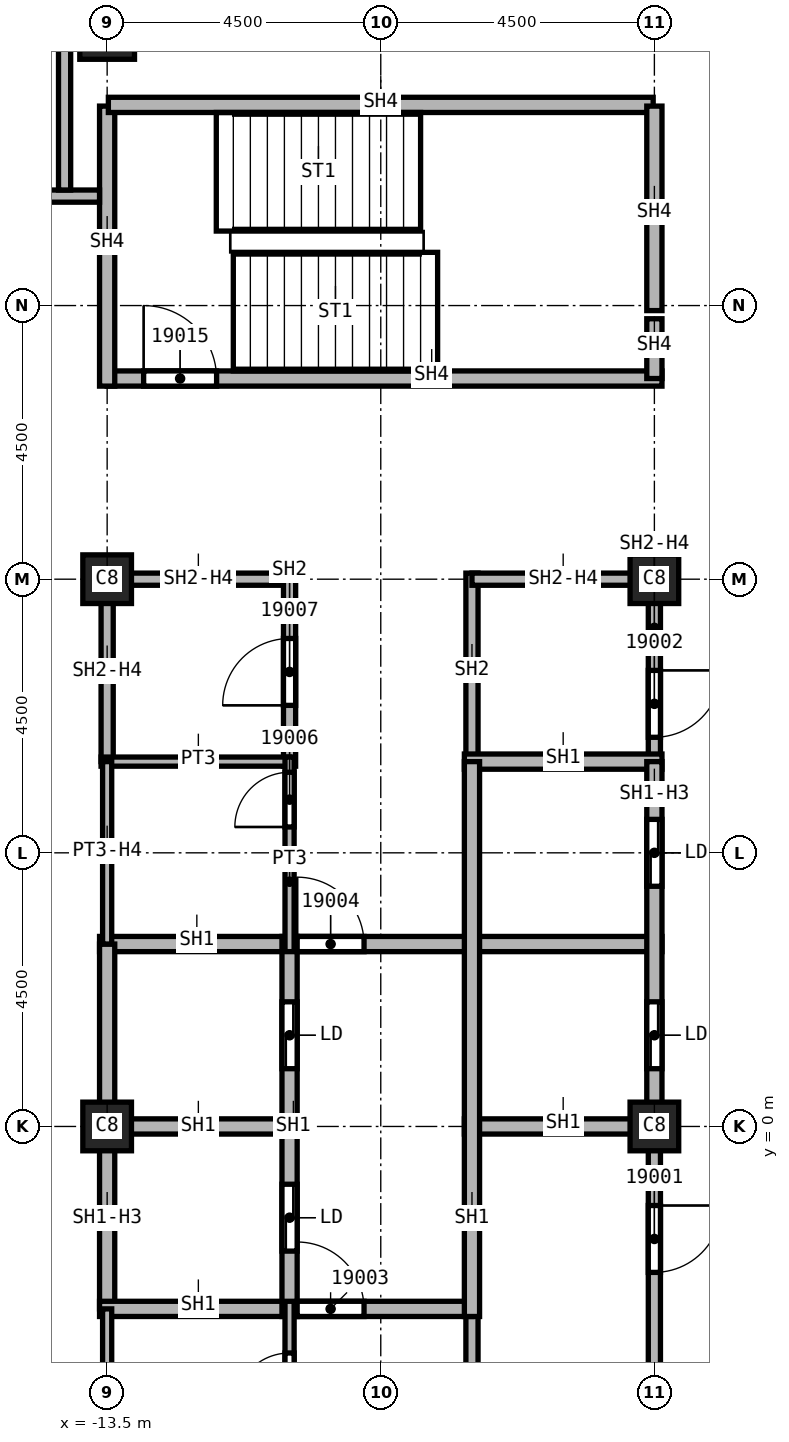
"""IFC4 building model, lengths in metres.
Left out: names, types, materials, properties, quantities, classifications, styles, units other than length and angle.
Written with IfcOpenShell. Run it as: python <this file> out.ifc"""

import sys

from ifc_helpers import new_model, si_unit, direction, frame, frame_2d, origin, origin_2d, place, context, subcontext, project, spatial, rectangle, extrude, element, fill, save


model = new_model("IFC4")
c1 = context("Model", 3, precision=1e-05, world=origin(), true_north=direction((0.0, 1.0)))
c2 = subcontext(c1, "Body", "Model", "MODEL_VIEW")
j1 = project(units=[si_unit("LENGTHUNIT", "METRE"), si_unit("PLANEANGLEUNIT", "RADIAN")], contexts=[c1])
p1 = place(None, origin())
s1 = spatial("IfcSite", under=j1, at=p1, CompositionType="ELEMENT")
p2 = place(p1, origin())
s2 = spatial("IfcBuilding", under=s1, at=p2, CompositionType="ELEMENT")
p3 = place(p2, frame((0.0, 0.0, 278.0)))
s3 = spatial("IfcBuildingStorey", under=s2, at=p3, CompositionType="ELEMENT", Elevation=278.0)
p4 = place(p3, frame((-13.5, 18.0, 0.0), z_axis=(0.0, 0.0, 1.0), x_axis=(1.0, 0.0, 0.0)))
e1 = element("IfcColumn", 1, at=p4, inside=s3, PredefinedType="COLUMN", context=c2, shape_type="SweptSolid", body=[
    extrude(rectangle(XDim=0.9, YDim=0.9, at=origin_2d()), origin(), (0.0, 0.0, 1.0), 3.72),
])
for number, where, z_axis, x_axis in (
    (2, (-4.5, 0.0, 0.0), (0.0, 0.0, 1.0), (1.0, 0.0, 0.0)),
    (3, (-4.5, 9.0, 0.0), (0.0, 0.0, 1.0), (1.0, 0.0, 0.0)),
    (4, (-13.5, 0.0, 0.0), (0.0, 0.0, 1.0), (1.0, 0.0, 0.0)),
    (5, (-13.5, 9.0, 0.0), (0.0, 0.0, 1.0), (1.0, 0.0, 0.0)),
):
    element("IfcColumn", number, at=place(p3, frame(where, z_axis=z_axis, x_axis=x_axis)), inside=s3, PredefinedType="COLUMN", context=c2, shape_type="SweptSolid", body=[
        extrude(rectangle(XDim=0.8, YDim=0.8, at=origin_2d()), origin(), (0.0, 0.0, 1.0), 3.72),
    ])
p5 = place(p3, frame((-13.5, 6.0, 0.0), z_axis=(0.0, 0.0, 1.0), x_axis=(0.0, 1.0, 0.0)))
e6 = element("IfcWall", 6, at=p5, inside=s3, PredefinedType="SOLIDWALL", context=c2, shape_type="SweptSolid", body=[
    extrude(rectangle(XDim=3.1, YDim=0.2, at=frame_2d((1.55, 0.0))), origin(), (0.0, 0.0, 1.0), 3.042),
])
p6 = place(p3, frame((-13.5, 9.0, 0.0), z_axis=(0.0, 0.0, 1.0), x_axis=(1.0, 0.0, 0.0)))
e7 = element("IfcWall", 7, at=p6, inside=s3, PredefinedType="SOLIDWALL", context=c2, shape_type="SweptSolid", body=[
    extrude(rectangle(XDim=3.0, YDim=0.2, at=frame_2d((1.5, 0.0))), origin(), (0.0, 0.0, 1.0), 3.042),
])
p7 = place(p3, frame((-10.5, 5.925, 0.0), z_axis=(0.0, 0.0, 1.0), x_axis=(0.0, 1.0, 0.0)))
e8 = element("IfcWall", 8, at=p7, inside=s3, PredefinedType="SOLIDWALL", context=c2, shape_type="SweptSolid", body=[
    extrude(rectangle(XDim=3.175, YDim=0.2, at=frame_2d((1.587, 0.0))), origin(), (0.0, 0.0, 1.0), 3.72),
])
p8 = place(p7, frame((1.0, 0.0, 0.0)))
e9 = element("IfcOpeningElement", 9, at=p8, cuts=e8, PredefinedType="OPENING", context=c2, shape_type="SweptSolid", body=[
    extrude(rectangle(XDim=1.1, YDim=2.1, at=frame_2d((0.55, 1.05))), frame((0.0, 0.1, 0.0), z_axis=(0.0, -1.0, 0.0), x_axis=(1.0, 0.0, 0.0)), (0.0, 0.0, 1.0), 0.2),
])
p9 = place(p3, frame((-7.5, -9.1, 0.0), z_axis=(0.0, 0.0, 1.0), x_axis=(0.0, 1.0, 0.0)))
e10 = element("IfcWall", 10, at=p9, inside=s3, PredefinedType="SOLIDWALL", context=c2, shape_type="SweptSolid", body=[
    extrude(rectangle(XDim=6.225, YDim=0.2, at=frame_2d((3.113, 0.0))), origin(), (0.0, 0.0, 1.0), 3.72),
])
p10 = place(p3, frame((-7.5, 6.0, 0.0), z_axis=(0.0, 0.0, 1.0), x_axis=(0.0, 1.0, 0.0)))
e11 = element("IfcWall", 11, at=p10, inside=s3, PredefinedType="SOLIDWALL", context=c2, shape_type="SweptSolid", body=[
    extrude(rectangle(XDim=3.1, YDim=0.2, at=frame_2d((1.55, 0.0))), origin(), (0.0, 0.0, 1.0), 3.72),
])
p11 = place(p3, frame((-7.5, 9.0, 0.0), z_axis=(0.0, 0.0, 1.0), x_axis=(1.0, 0.0, 0.0)))
e12 = element("IfcWall", 12, at=p11, inside=s3, PredefinedType="SOLIDWALL", context=c2, shape_type="SweptSolid", body=[
    extrude(rectangle(XDim=3.0, YDim=0.2, at=frame_2d((1.5, 0.0))), origin(), (0.0, 0.0, 1.0), 3.042),
])
p12 = place(p3, frame((-4.5, 0.0, 0.0), z_axis=(0.0, 0.0, 1.0), x_axis=(0.0, -1.0, 0.0)))
e13 = element("IfcWall", 13, at=p12, inside=s3, PredefinedType="SOLIDWALL", context=c2, shape_type="SweptSolid", body=[
    extrude(rectangle(XDim=9.1, YDim=0.2, at=frame_2d((4.55, 0.0))), origin(), (0.0, 0.0, 1.0), 3.042),
])
p13 = place(p12, frame((1.3, 0.0, 0.0)))
e14 = element("IfcOpeningElement", 14, at=p13, cuts=e13, PredefinedType="OPENING", context=c2, shape_type="SweptSolid", body=[
    extrude(rectangle(XDim=1.1, YDim=2.1, at=frame_2d((0.55, 1.05))), frame((0.0, 0.1, 0.0), z_axis=(0.0, -1.0, 0.0), x_axis=(1.0, 0.0, 0.0)), (0.0, 0.0, 1.0), 0.2),
])
p14 = place(p3, frame((-4.5, 9.1, 0.0), z_axis=(0.0, 0.0, 1.0), x_axis=(0.0, -1.0, 0.0)))
e15 = element("IfcWall", 15, at=p14, inside=s3, PredefinedType="SOLIDWALL", context=c2, shape_type="SweptSolid", body=[
    extrude(rectangle(XDim=3.1, YDim=0.2, at=frame_2d((1.55, 0.0))), origin(), (0.0, 0.0, 1.0), 3.042),
])
p15 = place(p14, frame((1.6, 0.0, 0.0)))
e16 = element("IfcOpeningElement", 16, at=p15, cuts=e15, PredefinedType="OPENING", context=c2, shape_type="SweptSolid", body=[
    extrude(rectangle(XDim=1.1, YDim=2.1, at=frame_2d((0.55, 1.05))), frame((0.0, 0.1, 0.0), z_axis=(0.0, -1.0, 0.0), x_axis=(1.0, 0.0, 0.0)), (0.0, 0.0, 1.0), 0.2),
])
p16 = place(p3, frame((-13.625, 0.0, 0.0), z_axis=(0.0, 0.0, 1.0), x_axis=(1.0, 0.0, 0.0)))
e17 = element("IfcWall", 17, at=p16, inside=s3, PredefinedType="SOLIDWALL", context=c2, shape_type="SweptSolid", body=[
    extrude(rectangle(XDim=3.125, YDim=0.25, at=frame_2d((1.562, 0.0))), origin(), (0.0, 0.0, 1.0), 3.72),
])
p17 = place(p3, frame((-13.625, 3.0, 0.0), z_axis=(0.0, 0.0, 1.0), x_axis=(1.0, 0.0, 0.0)))
e18 = element("IfcWall", 18, at=p17, inside=s3, PredefinedType="SOLIDWALL", context=c2, shape_type="SweptSolid", body=[
    extrude(rectangle(XDim=9.25, YDim=0.25, at=frame_2d((4.625, 0.0))), origin(), (0.0, 0.0, 1.0), 3.72),
])
p18 = place(p17, frame((3.25, 0.0, 0.0)))
e19 = element("IfcOpeningElement", 19, at=p18, cuts=e18, PredefinedType="OPENING", context=c2, shape_type="SweptSolid", body=[
    extrude(rectangle(XDim=1.1, YDim=2.1, at=frame_2d((0.55, 1.05))), frame((0.0, 0.125, 0.0), z_axis=(0.0, -1.0, 0.0), x_axis=(1.0, 0.0, 0.0)), (0.0, 0.0, 1.0), 0.25),
])
p19 = place(p3, frame((-13.5, -3.0, 0.0), z_axis=(0.0, 0.0, 1.0), x_axis=(0.0, 1.0, 0.0)))
e20 = element("IfcWall", 20, at=p19, inside=s3, PredefinedType="SOLIDWALL", context=c2, shape_type="SweptSolid", body=[
    extrude(rectangle(XDim=6.0, YDim=0.25, at=frame_2d((3.0, 0.0))), origin(), (0.0, 0.0, 1.0), 3.042),
])
p20 = place(p3, frame((-13.625, -3.0, 0.0), z_axis=(0.0, 0.0, 1.0), x_axis=(1.0, 0.0, 0.0)))
e21 = element("IfcWall", 21, at=p20, inside=s3, PredefinedType="SOLIDWALL", context=c2, shape_type="SweptSolid", body=[
    extrude(rectangle(XDim=6.125, YDim=0.25, at=frame_2d((3.062, 0.0))), origin(), (0.0, 0.0, 1.0), 3.72),
])
p21 = place(p20, frame((3.25, 0.0, 0.0)))
e22 = element("IfcOpeningElement", 22, at=p21, cuts=e21, PredefinedType="OPENING", context=c2, shape_type="SweptSolid", body=[
    extrude(rectangle(XDim=1.1, YDim=2.1, at=frame_2d((0.55, 1.05))), frame((0.0, 0.125, 0.0), z_axis=(0.0, -1.0, 0.0), x_axis=(1.0, 0.0, 0.0)), (0.0, 0.0, 1.0), 0.25),
])
p22 = place(p3, frame((-10.5, -3.125, 0.0), z_axis=(0.0, 0.0, 1.0), x_axis=(0.0, 1.0, 0.0)))
e23 = element("IfcWall", 23, at=p22, inside=s3, PredefinedType="SOLIDWALL", context=c2, shape_type="SweptSolid", body=[
    extrude(rectangle(XDim=6.25, YDim=0.25, at=frame_2d((3.125, 0.0))), origin(), (0.0, 0.0, 1.0), 3.72),
])
p23 = place(p22, frame((1.075, 0.0, 0.0)))
e24 = element("IfcOpeningElement", 24, at=p23, cuts=e23, PredefinedType="OPENING", context=c2, shape_type="SweptSolid", body=[
    extrude(rectangle(XDim=1.1, YDim=2.1, at=frame_2d((0.55, 1.05))), frame((0.0, 0.125, 0.0), z_axis=(0.0, -1.0, 0.0), x_axis=(1.0, 0.0, 0.0)), (0.0, 0.0, 1.0), 0.25),
])
p24 = place(p22, frame((4.075, 0.0, 0.0)))
e25 = element("IfcOpeningElement", 25, at=p24, cuts=e23, PredefinedType="OPENING", context=c2, shape_type="SweptSolid", body=[
    extrude(rectangle(XDim=1.1, YDim=2.1, at=frame_2d((0.55, 1.05))), frame((0.0, 0.125, 0.0), z_axis=(0.0, -1.0, 0.0), x_axis=(1.0, 0.0, 0.0)), (0.0, 0.0, 1.0), 0.25),
])
for number, where, z_axis, x_axis in (
    (26, (-7.625, 0.0, 0.0), (0.0, 0.0, 1.0), (1.0, 0.0, 0.0)),
    (27, (-7.625, 6.0, 0.0), (0.0, 0.0, 1.0), (1.0, 0.0, 0.0)),
):
    element("IfcWall", number, at=place(p3, frame(where, z_axis=z_axis, x_axis=x_axis)), inside=s3, PredefinedType="SOLIDWALL", context=c2, shape_type="SweptSolid", body=[
        extrude(rectangle(XDim=3.25, YDim=0.25, at=frame_2d((1.625, 0.0))), origin(), (0.0, 0.0, 1.0), 3.72),
    ])
p25 = place(p3, frame((-7.5, -3.125, 0.0), z_axis=(0.0, 0.0, 1.0), x_axis=(0.0, 1.0, 0.0)))
e28 = element("IfcWall", 28, at=p25, inside=s3, PredefinedType="SOLIDWALL", context=c2, shape_type="SweptSolid", body=[
    extrude(rectangle(XDim=9.125, YDim=0.25, at=frame_2d((4.562, 0.0))), origin(), (0.0, 0.0, 1.0), 3.72),
])
p26 = place(p3, frame((-4.5, 6.0, 0.0), z_axis=(0.0, 0.0, 1.0), x_axis=(0.0, -1.0, 0.0)))
e29 = element("IfcWall", 29, at=p26, inside=s3, PredefinedType="SOLIDWALL", context=c2, shape_type="SweptSolid", body=[
    extrude(rectangle(XDim=6.0, YDim=0.25, at=frame_2d((3.0, 0.0))), origin(), (0.0, 0.0, 1.0), 3.042),
])
p27 = place(p26, frame((3.95, 0.0, 0.0)))
e30 = element("IfcOpeningElement", 30, at=p27, cuts=e29, PredefinedType="OPENING", context=c2, shape_type="SweptSolid", body=[
    extrude(rectangle(XDim=1.1, YDim=2.1, at=frame_2d((0.55, 1.05))), frame((0.0, 0.125, 0.0), z_axis=(0.0, -1.0, 0.0), x_axis=(1.0, 0.0, 0.0)), (0.0, 0.0, 1.0), 0.25),
])
p28 = place(p26, frame((0.95, 0.0, 0.0)))
e31 = element("IfcOpeningElement", 31, at=p28, cuts=e29, PredefinedType="OPENING", context=c2, shape_type="SweptSolid", body=[
    extrude(rectangle(XDim=1.1, YDim=2.1, at=frame_2d((0.55, 1.05))), frame((0.0, 0.125, 0.0), z_axis=(0.0, -1.0, 0.0), x_axis=(1.0, 0.0, 0.0)), (0.0, 0.0, 1.0), 0.25),
])
p29 = place(p3, frame((-13.5, 12.3, 0.0), z_axis=(0.0, 0.0, 1.0), x_axis=(1.0, 0.0, 0.0)))
e32 = element("IfcWall", 32, at=p29, inside=s3, PredefinedType="SOLIDWALL", context=c2, shape_type="SweptSolid", body=[
    extrude(rectangle(XDim=9.125, YDim=0.25, at=frame_2d((4.562, 0.0))), origin(), (0.0, 0.0, 1.0), 3.72),
])
p30 = place(p29, frame((0.6, 0.0, 0.0)))
e33 = element("IfcOpeningElement", 33, at=p30, cuts=e32, PredefinedType="OPENING", context=c2, shape_type="SweptSolid", body=[
    extrude(rectangle(XDim=1.2, YDim=2.1, at=frame_2d((0.6, 1.05))), frame((0.0, 0.125, 0.0), z_axis=(0.0, -1.0, 0.0), x_axis=(1.0, 0.0, 0.0)), (0.0, 0.0, 1.0), 0.25),
])
p31 = place(p3, frame((-13.5, 16.78, 0.0), z_axis=(0.0, 0.0, 1.0), x_axis=(0.0, -1.0, 0.0)))
e34 = element("IfcWall", 34, at=p31, inside=s3, PredefinedType="SOLIDWALL", context=c2, shape_type="SweptSolid", body=[
    extrude(rectangle(XDim=4.605, YDim=0.25, at=frame_2d((2.302, 0.0))), origin(), (0.0, 0.0, 1.0), 3.72),
])
p32 = place(p3, frame((-13.48, 16.8, 0.0), z_axis=(0.0, 0.0, 1.0), x_axis=(1.0, 0.0, 0.0)))
e35 = element("IfcWall", 35, at=p32, inside=s3, PredefinedType="SOLIDWALL", context=c2, shape_type="SweptSolid", body=[
    extrude(rectangle(XDim=8.96, YDim=0.25, at=frame_2d((4.48, 0.0))), origin(), (0.0, 0.0, 1.0), 3.72),
])
p33 = place(p3, frame((-4.5, 13.283, 0.0), z_axis=(0.0, 0.0, 1.0), x_axis=(0.0, -1.0, 0.0)))
e36 = element("IfcWall", 36, at=p33, inside=s3, PredefinedType="SOLIDWALL", context=c2, shape_type="SweptSolid", body=[
    extrude(rectangle(XDim=0.983, YDim=0.25, at=frame_2d((0.491, 0.0))), origin(), (0.0, 0.0, 1.0), 3.72),
])
p34 = place(p3, frame((-4.5, 16.78, 0.0), z_axis=(0.0, 0.0, 1.0), x_axis=(0.0, -1.0, 0.0)))
e37 = element("IfcWall", 37, at=p34, inside=s3, PredefinedType="SOLIDWALL", context=c2, shape_type="SweptSolid", body=[
    extrude(rectangle(XDim=3.363, YDim=0.25, at=frame_2d((1.682, 0.0))), origin(), (0.0, 0.0, 1.0), 3.72),
])
p35 = place(p3, frame((-13.6, 6.0, 0.0), z_axis=(0.0, 0.0, 1.0), x_axis=(1.0, 0.0, 0.0)))
e38 = element("IfcWall", 38, at=p35, inside=s3, PredefinedType="PARTITIONING", context=c2, shape_type="SweptSolid", body=[
    extrude(rectangle(XDim=3.1, YDim=0.15, at=frame_2d((1.55, 0.0))), origin(), (0.0, 0.0, 1.0), 3.72),
])
p36 = place(p3, frame((-13.5, -9.075, 0.0), z_axis=(0.0, 0.0, 1.0), x_axis=(0.0, 1.0, 0.0)))
e39 = element("IfcWall", 39, at=p36, inside=s3, PredefinedType="PARTITIONING", context=c2, shape_type="SweptSolid", body=[
    extrude(rectangle(XDim=6.075, YDim=0.15, at=frame_2d((3.038, 0.0))), origin(), (0.0, 0.0, 1.0), 3.042),
])
p37 = place(p3, frame((-13.5, 3.0, 0.0), z_axis=(0.0, 0.0, 1.0), x_axis=(0.0, 1.0, 0.0)))
e40 = element("IfcWall", 40, at=p37, inside=s3, PredefinedType="PARTITIONING", context=c2, shape_type="SweptSolid", body=[
    extrude(rectangle(XDim=3.0, YDim=0.15, at=frame_2d((1.5, 0.0))), origin(), (0.0, 0.0, 1.0), 3.042),
])
p38 = place(p3, frame((-10.5, -9.075, 0.0), z_axis=(0.0, 0.0, 1.0), x_axis=(0.0, 1.0, 0.0)))
e41 = element("IfcWall", 41, at=p38, inside=s3, PredefinedType="PARTITIONING", context=c2, shape_type="SweptSolid", body=[
    extrude(rectangle(XDim=6.2, YDim=0.15, at=frame_2d((3.1, 0.0))), origin(), (0.0, 0.0, 1.0), 3.72),
])
p39 = place(p38, frame((4.45, 0.0, 0.0)))
e42 = element("IfcOpeningElement", 42, at=p39, cuts=e41, PredefinedType="OPENING", context=c2, shape_type="SweptSolid", body=[
    extrude(rectangle(XDim=0.9, YDim=2.1, at=frame_2d((0.45, 1.05))), frame((0.0, 0.075, 0.0), z_axis=(0.0, -1.0, 0.0), x_axis=(1.0, 0.0, 0.0)), (0.0, 0.0, 1.0), 0.15),
])
p40 = place(p3, frame((-10.5, 2.875, 0.0), z_axis=(0.0, 0.0, 1.0), x_axis=(0.0, 1.0, 0.0)))
e43 = element("IfcWall", 43, at=p40, inside=s3, PredefinedType="PARTITIONING", context=c2, shape_type="SweptSolid", body=[
    extrude(rectangle(XDim=3.2, YDim=0.15, at=frame_2d((1.6, 0.0))), origin(), (0.0, 0.0, 1.0), 3.72),
])
p41 = place(p40, frame((2.05, 0.0, 0.0)))
e44 = element("IfcOpeningElement", 44, at=p41, cuts=e43, PredefinedType="OPENING", context=c2, shape_type="SweptSolid", body=[
    extrude(rectangle(XDim=0.9, YDim=2.1, at=frame_2d((0.45, 1.05))), frame((0.0, 0.075, 0.0), z_axis=(0.0, -1.0, 0.0), x_axis=(1.0, 0.0, 0.0)), (0.0, 0.0, 1.0), 0.15),
])
p42 = place(p3, frame((-21.9, 15.3, 0.0), z_axis=(0.0, 0.0, 1.0), x_axis=(1.0, 0.0, 0.0)))
e45 = element("IfcWall", 45, at=p42, inside=s3, PredefinedType="SOLIDWALL", context=c2, shape_type="SweptSolid", body=[
    extrude(rectangle(XDim=8.275, YDim=0.2, at=frame_2d((4.137, 0.0))), origin(), (0.0, 0.0, 1.0), 3.72),
])
p43 = place(p42, frame((4.8, 0.0, 0.0)))
e46 = element("IfcOpeningElement", 46, at=p43, cuts=e45, PredefinedType="OPENING", context=c2, shape_type="SweptSolid", body=[
    extrude(rectangle(XDim=1.2, YDim=2.1, at=frame_2d((0.6, 1.05))), frame((0.0, 0.1, 0.0), z_axis=(0.0, -1.0, 0.0), x_axis=(1.0, 0.0, 0.0)), (0.0, 0.0, 1.0), 0.2),
])
p44 = place(p3, frame((-14.2, 15.4, 0.0), z_axis=(0.0, 0.0, 1.0), x_axis=(0.0, 1.0, 0.0)))
e47 = element("IfcWall", 47, at=p44, inside=s3, PredefinedType="SOLIDWALL", context=c2, shape_type="SweptSolid", body=[
    extrude(rectangle(XDim=5.9, YDim=0.2, at=frame_2d((2.95, 0.0))), origin(), (0.0, 0.0, 1.0), 3.72),
])
p45 = place(p13, origin())
e48 = element("IfcDoor", 48, at=p45, inside=s3, OperationType="SINGLE_SWING_RIGHT", PredefinedType="DOOR", context=c2, shape_type="SweptSolid", body=[
    extrude(rectangle(XDim=1.1, YDim=2.1, at=frame_2d((0.55, 1.05))), frame((0.0, 0.025, 0.0), z_axis=(0.0, -1.0, 0.0), x_axis=(1.0, 0.0, 0.0)), (0.0, 0.0, 1.0), 0.05),
])
fill(e14, e48)
p46 = place(p15, origin())
e49 = element("IfcDoor", 49, at=p46, inside=s3, OperationType="SINGLE_SWING_LEFT", PredefinedType="DOOR", context=c2, shape_type="SweptSolid", body=[
    extrude(rectangle(XDim=1.1, YDim=2.1, at=frame_2d((0.55, 1.05))), frame((0.0, 0.025, 0.0), z_axis=(0.0, -1.0, 0.0), x_axis=(1.0, 0.0, 0.0)), (0.0, 0.0, 1.0), 0.05),
])
fill(e16, e49)
p47 = place(p21, origin())
e50 = element("IfcDoor", 50, at=p47, inside=s3, OperationType="SINGLE_SWING_RIGHT", PredefinedType="DOOR", context=c2, shape_type="SweptSolid", body=[
    extrude(rectangle(XDim=1.1, YDim=2.1, at=frame_2d((0.55, 1.05))), frame((0.0, 0.025, 0.0), z_axis=(0.0, -1.0, 0.0), x_axis=(1.0, 0.0, 0.0)), (0.0, 0.0, 1.0), 0.05),
])
fill(e22, e50)
p48 = place(p18, origin())
e51 = element("IfcDoor", 51, at=p48, inside=s3, OperationType="SINGLE_SWING_LEFT", PredefinedType="DOOR", context=c2, shape_type="SweptSolid", body=[
    extrude(rectangle(XDim=1.1, YDim=2.1, at=frame_2d((0.55, 1.05))), frame((0.0, 0.025, 0.0), z_axis=(0.0, -1.0, 0.0), x_axis=(1.0, 0.0, 0.0)), (0.0, 0.0, 1.0), 0.05),
])
fill(e19, e51)
p49 = place(p39, origin())
e52 = element("IfcDoor", 52, at=p49, inside=s3, OperationType="SINGLE_SWING_RIGHT", PredefinedType="DOOR", context=c2, shape_type="SweptSolid", body=[
    extrude(rectangle(XDim=0.9, YDim=2.1, at=frame_2d((0.45, 1.05))), frame((0.0, 0.025, 0.0), z_axis=(0.0, -1.0, 0.0), x_axis=(1.0, 0.0, 0.0)), (0.0, 0.0, 1.0), 0.05),
])
fill(e42, e52)
p50 = place(p41, origin())
e53 = element("IfcDoor", 53, at=p50, inside=s3, OperationType="SINGLE_SWING_LEFT", PredefinedType="DOOR", context=c2, shape_type="SweptSolid", body=[
    extrude(rectangle(XDim=0.9, YDim=2.1, at=frame_2d((0.45, 1.05))), frame((0.0, 0.025, 0.0), z_axis=(0.0, -1.0, 0.0), x_axis=(1.0, 0.0, 0.0)), (0.0, 0.0, 1.0), 0.05),
])
fill(e44, e53)
p51 = place(p8, origin())
e54 = element("IfcDoor", 54, at=p51, inside=s3, OperationType="SINGLE_SWING_RIGHT", PredefinedType="DOOR", context=c2, shape_type="SweptSolid", body=[
    extrude(rectangle(XDim=1.1, YDim=2.1, at=frame_2d((0.55, 1.05))), frame((0.0, 0.025, 0.0), z_axis=(0.0, -1.0, 0.0), x_axis=(1.0, 0.0, 0.0)), (0.0, 0.0, 1.0), 0.05),
])
fill(e9, e54)
p52 = place(p30, origin())
e55 = element("IfcDoor", 55, at=p52, inside=s3, OperationType="SINGLE_SWING_RIGHT", PredefinedType="DOOR", context=c2, shape_type="SweptSolid", body=[
    extrude(rectangle(XDim=1.2, YDim=2.1, at=frame_2d((0.6, 1.05))), frame((0.0, 0.025, 0.0), z_axis=(0.0, -1.0, 0.0), x_axis=(1.0, 0.0, 0.0)), (0.0, 0.0, 1.0), 0.05),
])
fill(e33, e55)
p53 = place(p27, origin())
e56 = element("IfcDoor", 56, at=p53, inside=s3, OperationType="SLIDING_TO_LEFT", PredefinedType="DOOR", context=c2, shape_type="SweptSolid", body=[
    extrude(rectangle(XDim=1.1, YDim=2.1, at=frame_2d((0.55, 1.05))), frame((0.0, 0.025, 0.0), z_axis=(0.0, -1.0, 0.0), x_axis=(1.0, 0.0, 0.0)), (0.0, 0.0, 1.0), 0.05),
])
fill(e30, e56)
p54 = place(p28, origin())
e57 = element("IfcDoor", 57, at=p54, inside=s3, OperationType="SLIDING_TO_LEFT", PredefinedType="DOOR", context=c2, shape_type="SweptSolid", body=[
    extrude(rectangle(XDim=1.1, YDim=2.1, at=frame_2d((0.55, 1.05))), frame((0.0, 0.025, 0.0), z_axis=(0.0, -1.0, 0.0), x_axis=(1.0, 0.0, 0.0)), (0.0, 0.0, 1.0), 0.05),
])
fill(e31, e57)
p55 = place(p23, origin())
e58 = element("IfcDoor", 58, at=p55, inside=s3, OperationType="SLIDING_TO_LEFT", PredefinedType="DOOR", context=c2, shape_type="SweptSolid", body=[
    extrude(rectangle(XDim=1.1, YDim=2.1, at=frame_2d((0.55, 1.05))), frame((0.0, 0.025, 0.0), z_axis=(0.0, -1.0, 0.0), x_axis=(1.0, 0.0, 0.0)), (0.0, 0.0, 1.0), 0.05),
])
fill(e24, e58)
p56 = place(p24, origin())
e59 = element("IfcDoor", 59, at=p56, inside=s3, OperationType="SLIDING_TO_LEFT", PredefinedType="DOOR", context=c2, shape_type="SweptSolid", body=[
    extrude(rectangle(XDim=1.1, YDim=2.1, at=frame_2d((0.55, 1.05))), frame((0.0, 0.025, 0.0), z_axis=(0.0, -1.0, 0.0), x_axis=(1.0, 0.0, 0.0)), (0.0, 0.0, 1.0), 0.05),
])
fill(e25, e59)
save(model, sys.argv[1])
